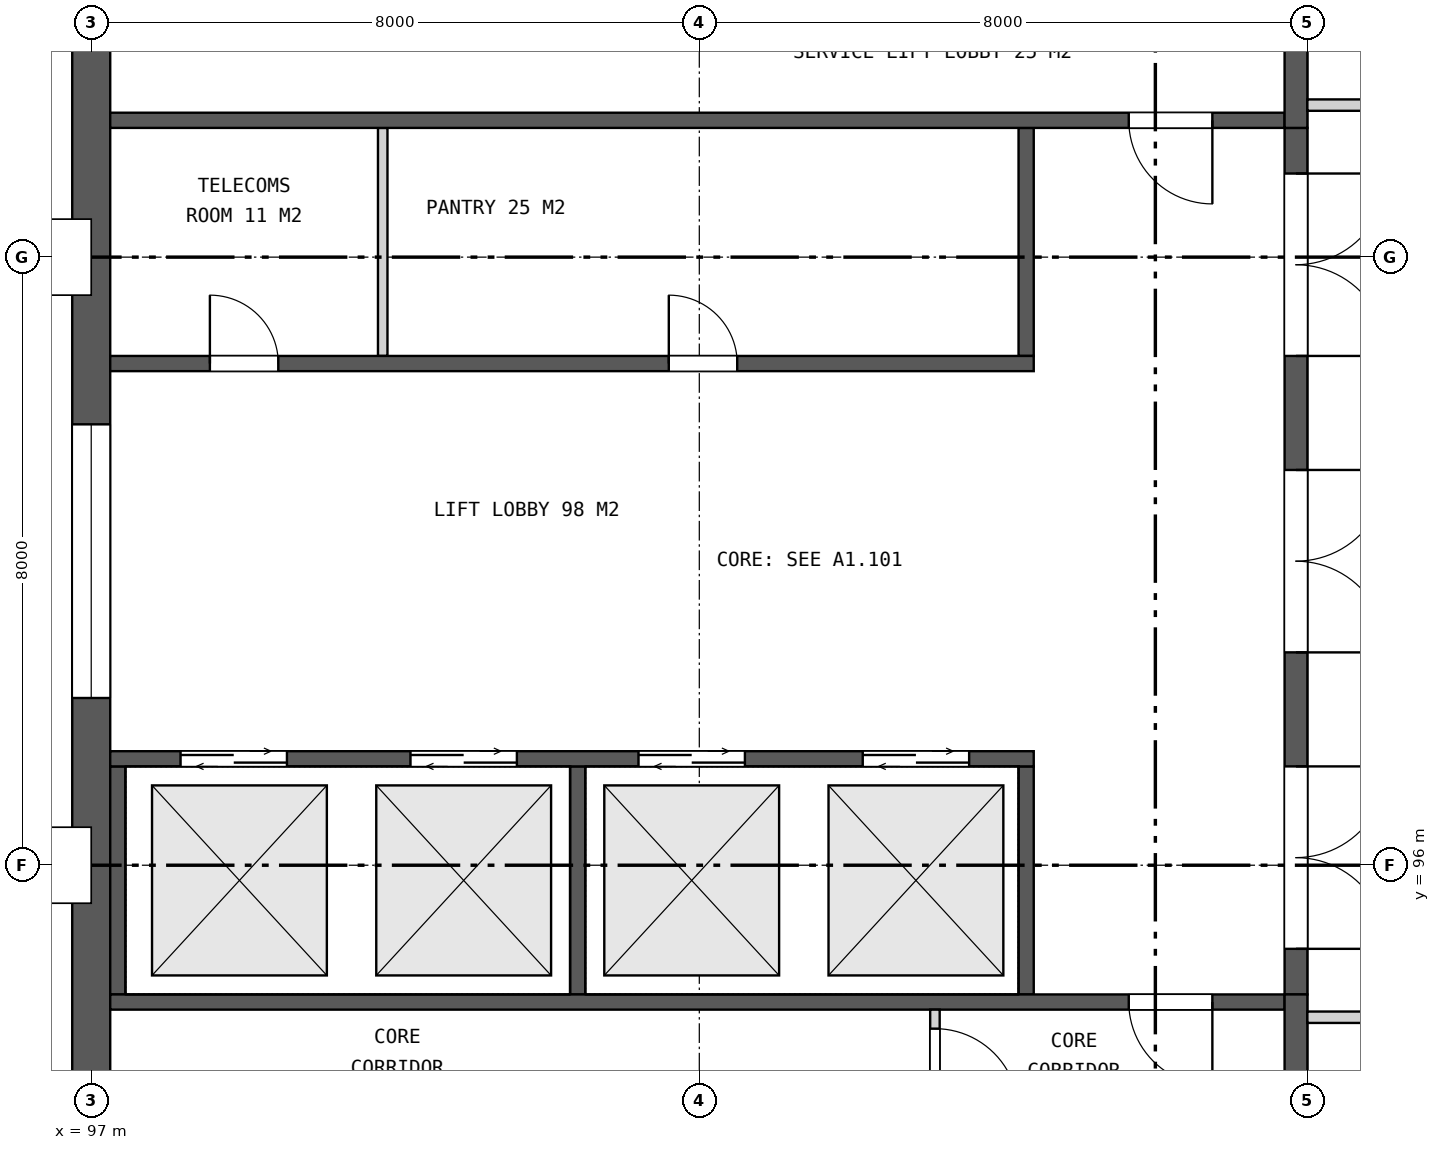
"""IFC4 building model, lengths in metres.
Left out: names, types, materials, properties, quantities, classifications, styles, units other than length and angle.
Written with IfcOpenShell. Run it as: python <this file> out.ifc"""

import sys

from ifc_helpers import new_model, si_unit, direction, frame, frame_2d, origin, place, context, subcontext, project, spatial, rectangle, extrude, element, fill, save


model = new_model("IFC4")
c1 = context("Model", 3, precision=1e-05, world=origin(), true_north=direction((0.0, 1.0)))
c2 = subcontext(c1, "Body", "Model", "MODEL_VIEW")
j1 = project(units=[si_unit("LENGTHUNIT", "METRE"), si_unit("PLANEANGLEUNIT", "RADIAN")], contexts=[c1])
p1 = place(None, origin())
s1 = spatial("IfcSite", under=j1, at=p1, CompositionType="ELEMENT")
p2 = place(p1, origin())
s2 = spatial("IfcBuilding", under=s1, at=p2, CompositionType="ELEMENT")
p3 = place(p2, frame((0.0, 0.0, 299.7)))
s3 = spatial("IfcBuildingStorey", under=s2, at=p3, CompositionType="ELEMENT", Elevation=299.7)
p4 = place(p3, frame((97.0, 111.75, 0.0), z_axis=(0.0, 0.0, 1.0), x_axis=(0.0, -1.0, 0.0)))
e1 = element("IfcWall", 1, at=p4, inside=s3, PredefinedType="SHEAR", context=c2, shape_type="SweptSolid", body=[
    extrude(rectangle(XDim=23.5, YDim=0.5, at=frame_2d((11.75, 0.0))), origin(), (0.0, 0.0, 1.0), 4.2),
])
p5 = place(p4, frame((9.95, 0.0, 0.15)))
e2 = element("IfcOpeningElement", 2, at=p5, cuts=e1, PredefinedType="OPENING", context=c2, shape_type="SweptSolid", body=[
    extrude(rectangle(XDim=3.6, YDim=3.0, at=frame_2d((1.8, 1.5))), frame((0.0, 0.26, 0.0), z_axis=(0.0, -1.0, 0.0), x_axis=(1.0, 0.0, 0.0)), (0.0, 0.0, 1.0), 0.52),
])
p6 = place(p3, frame((112.85, 105.7, 0.0), z_axis=(0.0, 0.0, 1.0), x_axis=(0.0, -1.0, 0.0)))
e3 = element("IfcWall", 3, at=p6, inside=s3, PredefinedType="SHEAR", context=c2, shape_type="SweptSolid", body=[
    extrude(rectangle(XDim=11.4, YDim=0.3, at=frame_2d((5.7, 0.0))), origin(), (0.0, 0.0, 1.0), 4.2),
])
p7 = place(p6, frame((0.6, 0.0, 0.0)))
e4 = element("IfcOpeningElement", 4, at=p7, cuts=e3, PredefinedType="OPENING", context=c2, shape_type="SweptSolid", body=[
    extrude(rectangle(XDim=2.4, YDim=2.4, at=frame_2d((1.2, 1.2))), frame((0.0, 0.16, 0.0), z_axis=(0.0, -1.0, 0.0), x_axis=(1.0, 0.0, 0.0)), (0.0, 0.0, 1.0), 0.32),
])
p8 = place(p6, frame((4.5, 0.0, 0.0)))
e5 = element("IfcOpeningElement", 5, at=p8, cuts=e3, PredefinedType="OPENING", context=c2, shape_type="SweptSolid", body=[
    extrude(rectangle(XDim=2.4, YDim=2.4, at=frame_2d((1.2, 1.2))), frame((0.0, 0.16, 0.0), z_axis=(0.0, -1.0, 0.0), x_axis=(1.0, 0.0, 0.0)), (0.0, 0.0, 1.0), 0.32),
])
p9 = place(p6, frame((8.4, 0.0, 0.0)))
e6 = element("IfcOpeningElement", 6, at=p9, cuts=e3, PredefinedType="OPENING", context=c2, shape_type="SweptSolid", body=[
    extrude(rectangle(XDim=2.4, YDim=2.4, at=frame_2d((1.2, 1.2))), frame((0.0, 0.16, 0.0), z_axis=(0.0, -1.0, 0.0), x_axis=(1.0, 0.0, 0.0)), (0.0, 0.0, 1.0), 0.32),
])
for number, where, z_axis, x_axis in (
    (7, (109.3, 97.3, 0.0), (0.0, 0.0, 1.0), (0.0, -1.0, 0.0)),
    (8, (103.4, 97.3, 0.0), (0.0, 0.0, 1.0), (0.0, -1.0, 0.0)),
    (9, (97.35, 97.3, 0.0), (0.0, 0.0, 1.0), (0.0, -1.0, 0.0)),
):
    element("IfcWall", number, at=place(p3, frame(where, z_axis=z_axis, x_axis=x_axis)), inside=s3, PredefinedType="SHEAR", context=c2, shape_type="SweptSolid", body=[
        extrude(rectangle(XDim=3.0, YDim=0.2, at=frame_2d((1.5, 0.0))), origin(), (0.0, 0.0, 1.0), 4.2),
    ])
p10 = place(p3, frame((109.4, 97.4, 0.0), z_axis=(0.0, 0.0, 1.0), x_axis=(-1.0, 0.0, 0.0)))
e10 = element("IfcWall", 10, at=p10, inside=s3, PredefinedType="SHEAR", context=c2, shape_type="SweptSolid", body=[
    extrude(rectangle(XDim=12.15, YDim=0.2, at=frame_2d((6.075, 0.0))), origin(), (0.0, 0.0, 1.0), 4.2),
])
p11 = place(p10, frame((0.85, 0.0, 0.0)))
e11 = element("IfcOpeningElement", 11, at=p11, cuts=e10, PredefinedType="OPENING", context=c2, shape_type="SweptSolid", body=[
    extrude(rectangle(XDim=1.4, YDim=2.1, at=frame_2d((0.7, 1.05))), frame((0.0, 0.11, 0.0), z_axis=(0.0, -1.0, 0.0), x_axis=(1.0, 0.0, 0.0)), (0.0, 0.0, 1.0), 0.22),
])
p12 = place(p10, frame((3.8, 0.0, 0.0)))
e12 = element("IfcOpeningElement", 12, at=p12, cuts=e10, PredefinedType="OPENING", context=c2, shape_type="SweptSolid", body=[
    extrude(rectangle(XDim=1.4, YDim=2.1, at=frame_2d((0.7, 1.05))), frame((0.0, 0.11, 0.0), z_axis=(0.0, -1.0, 0.0), x_axis=(1.0, 0.0, 0.0)), (0.0, 0.0, 1.0), 0.22),
])
p13 = place(p10, frame((6.8, 0.0, 0.0)))
e13 = element("IfcOpeningElement", 13, at=p13, cuts=e10, PredefinedType="OPENING", context=c2, shape_type="SweptSolid", body=[
    extrude(rectangle(XDim=1.4, YDim=2.1, at=frame_2d((0.7, 1.05))), frame((0.0, 0.11, 0.0), z_axis=(0.0, -1.0, 0.0), x_axis=(1.0, 0.0, 0.0)), (0.0, 0.0, 1.0), 0.22),
])
p14 = place(p10, frame((9.825, 0.0, 0.0)))
e14 = element("IfcOpeningElement", 14, at=p14, cuts=e10, PredefinedType="OPENING", context=c2, shape_type="SweptSolid", body=[
    extrude(rectangle(XDim=1.4, YDim=2.1, at=frame_2d((0.7, 1.05))), frame((0.0, 0.11, 0.0), z_axis=(0.0, -1.0, 0.0), x_axis=(1.0, 0.0, 0.0)), (0.0, 0.0, 1.0), 0.22),
])
p15 = place(p3, frame((109.3, 105.7, 0.0), z_axis=(0.0, 0.0, 1.0), x_axis=(0.0, -1.0, 0.0)))
e15 = element("IfcWall", 15, at=p15, inside=s3, PredefinedType="SHEAR", context=c2, shape_type="SweptSolid", body=[
    extrude(rectangle(XDim=3.0, YDim=0.2, at=frame_2d((1.5, 0.0))), origin(), (0.0, 0.0, 1.0), 4.2),
])
p16 = place(p3, frame((100.835, 105.7, 0.0), z_axis=(0.0, 0.0, 1.0), x_axis=(0.0, -1.0, 0.0)))
e16 = element("IfcWall", 16, at=p16, inside=s3, PredefinedType="PARTITIONING", context=c2, shape_type="SweptSolid", body=[
    extrude(rectangle(XDim=3.0, YDim=0.125, at=frame_2d((1.5, 0.0))), origin(), (0.0, 0.0, 1.0), 4.2),
])
p17 = place(p3, frame((109.4, 102.6, 0.0), z_axis=(0.0, 0.0, 1.0), x_axis=(-1.0, 0.0, 0.0)))
e17 = element("IfcWall", 17, at=p17, inside=s3, PredefinedType="SHEAR", context=c2, shape_type="SweptSolid", body=[
    extrude(rectangle(XDim=12.15, YDim=0.2, at=frame_2d((6.075, 0.0))), origin(), (0.0, 0.0, 1.0), 4.2),
])
p18 = place(p17, frame((3.901, 0.0, 0.0)))
e18 = element("IfcOpeningElement", 18, at=p18, cuts=e17, PredefinedType="OPENING", context=c2, shape_type="SweptSolid", body=[
    extrude(rectangle(XDim=0.9, YDim=2.1, at=frame_2d((0.45, 1.05))), frame((0.0, 0.11, 0.0), z_axis=(0.0, -1.0, 0.0), x_axis=(1.0, 0.0, 0.0)), (0.0, 0.0, 1.0), 0.22),
])
p19 = place(p17, frame((9.939, 0.0, 0.0)))
e19 = element("IfcOpeningElement", 19, at=p19, cuts=e17, PredefinedType="OPENING", context=c2, shape_type="SweptSolid", body=[
    extrude(rectangle(XDim=0.9, YDim=2.1, at=frame_2d((0.45, 1.05))), frame((0.0, 0.11, 0.0), z_axis=(0.0, -1.0, 0.0), x_axis=(1.0, 0.0, 0.0)), (0.0, 0.0, 1.0), 0.22),
])
p20 = place(p3, frame((112.7, 94.2, 0.0), z_axis=(0.0, 0.0, 1.0), x_axis=(-1.0, 0.0, 0.0)))
e20 = element("IfcWall", 20, at=p20, inside=s3, PredefinedType="SHEAR", context=c2, shape_type="SweptSolid", body=[
    extrude(rectangle(XDim=15.45, YDim=0.2, at=frame_2d((7.725, 0.0))), origin(), (0.0, 0.0, 1.0), 4.2),
])
p21 = place(p20, frame((0.95, 0.0, 0.0)))
e21 = element("IfcOpeningElement", 21, at=p21, cuts=e20, PredefinedType="OPENING", context=c2, shape_type="SweptSolid", body=[
    extrude(rectangle(XDim=1.1, YDim=2.1, at=frame_2d((0.55, 1.05))), frame((0.0, 0.11, 0.0), z_axis=(0.0, -1.0, 0.0), x_axis=(1.0, 0.0, 0.0)), (0.0, 0.0, 1.0), 0.22),
])
p22 = place(p3, frame((112.85, 94.3, 0.0), z_axis=(0.0, 0.0, 1.0), x_axis=(0.0, -1.0, 0.0)))
e22 = element("IfcWall", 22, at=p22, inside=s3, PredefinedType="SHEAR", context=c2, shape_type="SweptSolid", body=[
    extrude(rectangle(XDim=6.05, YDim=0.3, at=frame_2d((3.025, 0.0))), origin(), (0.0, 0.0, 1.0), 4.2),
])
p23 = place(p3, frame((108.1, 94.1, 0.0), z_axis=(0.0, 0.0, 1.0), x_axis=(0.0, -1.0, 0.0)))
e23 = element("IfcWall", 23, at=p23, inside=s3, PredefinedType="PARTITIONING", context=c2, shape_type="SweptSolid", body=[
    extrude(rectangle(XDim=1.6, YDim=0.125, at=frame_2d((0.8, 0.0))), origin(), (0.0, 0.0, 1.0), 4.2),
])
p24 = place(p23, frame((0.25, 0.0, 0.0)))
e24 = element("IfcOpeningElement", 24, at=p24, cuts=e23, PredefinedType="OPENING", context=c2, shape_type="SweptSolid", body=[
    extrude(rectangle(XDim=1.1, YDim=2.1, at=frame_2d((0.55, 1.05))), frame((0.0, 0.073, 0.0), z_axis=(0.0, -1.0, 0.0), x_axis=(1.0, 0.0, 0.0)), (0.0, 0.0, 1.0), 0.145),
])
p25 = place(p3, frame((112.7, 105.8, 0.0), z_axis=(0.0, 0.0, 1.0), x_axis=(-1.0, 0.0, 0.0)))
e25 = element("IfcWall", 25, at=p25, inside=s3, PredefinedType="SHEAR", context=c2, shape_type="SweptSolid", body=[
    extrude(rectangle(XDim=15.45, YDim=0.2, at=frame_2d((7.725, 0.0))), origin(), (0.0, 0.0, 1.0), 4.2),
])
p26 = place(p25, frame((0.95, 0.0, 0.0)))
e26 = element("IfcOpeningElement", 26, at=p26, cuts=e25, PredefinedType="OPENING", context=c2, shape_type="SweptSolid", body=[
    extrude(rectangle(XDim=1.1, YDim=2.1, at=frame_2d((0.55, 1.05))), frame((0.0, 0.11, 0.0), z_axis=(0.0, -1.0, 0.0), x_axis=(1.0, 0.0, 0.0)), (0.0, 0.0, 1.0), 0.22),
])
p27 = place(p3, frame((112.85, 111.75, 0.0), z_axis=(0.0, 0.0, 1.0), x_axis=(0.0, -1.0, 0.0)))
e27 = element("IfcWall", 27, at=p27, inside=s3, PredefinedType="SHEAR", context=c2, shape_type="SweptSolid", body=[
    extrude(rectangle(XDim=6.05, YDim=0.3, at=frame_2d((3.025, 0.0))), origin(), (0.0, 0.0, 1.0), 4.2),
])
p28 = place(p3, frame((113.0, 94.0, 0.0), z_axis=(0.0, 0.0, 1.0), x_axis=(1.0, 0.0, 0.0)))
e28 = element("IfcWall", 28, at=p28, inside=s3, PredefinedType="PARTITIONING", context=c2, shape_type="SweptSolid", body=[
    extrude(rectangle(XDim=5.5, YDim=0.15, at=frame_2d((2.75, 0.0))), origin(), (0.0, 0.0, 1.0), 3.255),
])
p29 = place(p3, frame((113.0, 106.0, 0.0), z_axis=(0.0, 0.0, 1.0), x_axis=(1.0, 0.0, 0.0)))
e29 = element("IfcWall", 29, at=p29, inside=s3, PredefinedType="PARTITIONING", context=c2, shape_type="SweptSolid", body=[
    extrude(rectangle(XDim=5.525, YDim=0.15, at=frame_2d((2.762, 0.0))), origin(), (0.0, 0.0, 1.0), 3.255),
])
p30 = place(p5, origin())
e30 = element("IfcWindow", 30, at=p30, inside=s3, PartitioningType="SINGLE_PANEL", PredefinedType="WINDOW", context=c2, shape_type="SweptSolid", body=[
    extrude(rectangle(XDim=3.6, YDim=3.0, at=frame_2d((1.8, 1.5))), frame((0.0, 0.03, 0.0), z_axis=(0.0, -1.0, 0.0), x_axis=(1.0, 0.0, 0.0)), (0.0, 0.0, 1.0), 0.06),
])
fill(e2, e30)
p31 = place(p7, origin())
e31 = element("IfcDoor", 31, at=p31, inside=s3, OperationType="DOUBLE_DOOR_SINGLE_SWING", PredefinedType="DOOR", context=c2, shape_type="SweptSolid", body=[
    extrude(rectangle(XDim=2.4, YDim=2.4, at=frame_2d((1.2, 1.2))), frame((0.0, 0.025, 0.0), z_axis=(0.0, -1.0, 0.0), x_axis=(1.0, 0.0, 0.0)), (0.0, 0.0, 1.0), 0.05),
])
fill(e4, e31)
p32 = place(p8, origin())
e32 = element("IfcDoor", 32, at=p32, inside=s3, OperationType="DOUBLE_DOOR_SINGLE_SWING", PredefinedType="DOOR", context=c2, shape_type="SweptSolid", body=[
    extrude(rectangle(XDim=2.4, YDim=2.4, at=frame_2d((1.2, 1.2))), frame((0.0, 0.025, 0.0), z_axis=(0.0, -1.0, 0.0), x_axis=(1.0, 0.0, 0.0)), (0.0, 0.0, 1.0), 0.05),
])
fill(e5, e32)
p33 = place(p9, origin())
e33 = element("IfcDoor", 33, at=p33, inside=s3, OperationType="DOUBLE_DOOR_SINGLE_SWING", PredefinedType="DOOR", context=c2, shape_type="SweptSolid", body=[
    extrude(rectangle(XDim=2.4, YDim=2.4, at=frame_2d((1.2, 1.2))), frame((0.0, 0.025, 0.0), z_axis=(0.0, -1.0, 0.0), x_axis=(1.0, 0.0, 0.0)), (0.0, 0.0, 1.0), 0.05),
])
fill(e6, e33)
p34 = place(p11, origin())
e34 = element("IfcDoor", 34, at=p34, inside=s3, OperationType="DOUBLE_DOOR_SLIDING", PredefinedType="DOOR", context=c2, shape_type="SweptSolid", body=[
    extrude(rectangle(XDim=1.4, YDim=2.1, at=frame_2d((0.7, 1.05))), frame((0.0, 0.025, 0.0), z_axis=(0.0, -1.0, 0.0), x_axis=(1.0, 0.0, 0.0)), (0.0, 0.0, 1.0), 0.05),
])
fill(e11, e34)
p35 = place(p12, origin())
e35 = element("IfcDoor", 35, at=p35, inside=s3, OperationType="DOUBLE_DOOR_SLIDING", PredefinedType="DOOR", context=c2, shape_type="SweptSolid", body=[
    extrude(rectangle(XDim=1.4, YDim=2.1, at=frame_2d((0.7, 1.05))), frame((0.0, 0.025, 0.0), z_axis=(0.0, -1.0, 0.0), x_axis=(1.0, 0.0, 0.0)), (0.0, 0.0, 1.0), 0.05),
])
fill(e12, e35)
p36 = place(p13, origin())
e36 = element("IfcDoor", 36, at=p36, inside=s3, OperationType="DOUBLE_DOOR_SLIDING", PredefinedType="DOOR", context=c2, shape_type="SweptSolid", body=[
    extrude(rectangle(XDim=1.4, YDim=2.1, at=frame_2d((0.7, 1.05))), frame((0.0, 0.025, 0.0), z_axis=(0.0, -1.0, 0.0), x_axis=(1.0, 0.0, 0.0)), (0.0, 0.0, 1.0), 0.05),
])
fill(e13, e36)
p37 = place(p14, origin())
e37 = element("IfcDoor", 37, at=p37, inside=s3, OperationType="DOUBLE_DOOR_SLIDING", PredefinedType="DOOR", context=c2, shape_type="SweptSolid", body=[
    extrude(rectangle(XDim=1.4, YDim=2.1, at=frame_2d((0.7, 1.05))), frame((0.0, 0.025, 0.0), z_axis=(0.0, -1.0, 0.0), x_axis=(1.0, 0.0, 0.0)), (0.0, 0.0, 1.0), 0.05),
])
fill(e14, e37)
p38 = place(p18, frame((0.9, 0.0, 0.0), z_axis=(0.0, 0.0, 1.0), x_axis=(-1.0, 0.0, 0.0)))
e38 = element("IfcDoor", 38, at=p38, inside=s3, OperationType="SINGLE_SWING_LEFT", PredefinedType="DOOR", context=c2, shape_type="SweptSolid", body=[
    extrude(rectangle(XDim=0.9, YDim=2.1, at=frame_2d((0.45, 1.05))), frame((0.0, 0.025, 0.0), z_axis=(0.0, -1.0, 0.0), x_axis=(1.0, 0.0, 0.0)), (0.0, 0.0, 1.0), 0.05),
])
fill(e18, e38)
p39 = place(p19, frame((0.9, 0.0, 0.0), z_axis=(0.0, 0.0, 1.0), x_axis=(-1.0, 0.0, 0.0)))
e39 = element("IfcDoor", 39, at=p39, inside=s3, OperationType="SINGLE_SWING_LEFT", PredefinedType="DOOR", context=c2, shape_type="SweptSolid", body=[
    extrude(rectangle(XDim=0.9, YDim=2.1, at=frame_2d((0.45, 1.05))), frame((0.0, 0.025, 0.0), z_axis=(0.0, -1.0, 0.0), x_axis=(1.0, 0.0, 0.0)), (0.0, 0.0, 1.0), 0.05),
])
fill(e19, e39)
p40 = place(p21, origin())
e40 = element("IfcDoor", 40, at=p40, inside=s3, OperationType="SINGLE_SWING_LEFT", PredefinedType="DOOR", context=c2, shape_type="SweptSolid", body=[
    extrude(rectangle(XDim=1.1, YDim=2.1, at=frame_2d((0.55, 1.05))), frame((0.0, 0.025, 0.0), z_axis=(0.0, -1.0, 0.0), x_axis=(1.0, 0.0, 0.0)), (0.0, 0.0, 1.0), 0.05),
])
fill(e21, e40)
p41 = place(p24, origin())
e41 = element("IfcDoor", 41, at=p41, inside=s3, OperationType="SINGLE_SWING_RIGHT", PredefinedType="DOOR", context=c2, shape_type="SweptSolid", body=[
    extrude(rectangle(XDim=1.1, YDim=2.1, at=frame_2d((0.55, 1.05))), frame((0.0, 0.025, 0.0), z_axis=(0.0, -1.0, 0.0), x_axis=(1.0, 0.0, 0.0)), (0.0, 0.0, 1.0), 0.05),
])
fill(e24, e41)
p42 = place(p26, origin())
e42 = element("IfcDoor", 42, at=p42, inside=s3, OperationType="SINGLE_SWING_LEFT", PredefinedType="DOOR", context=c2, shape_type="SweptSolid", body=[
    extrude(rectangle(XDim=1.1, YDim=2.1, at=frame_2d((0.55, 1.05))), frame((0.0, 0.025, 0.0), z_axis=(0.0, -1.0, 0.0), x_axis=(1.0, 0.0, 0.0)), (0.0, 0.0, 1.0), 0.05),
])
fill(e26, e42)
save(model, sys.argv[1])
